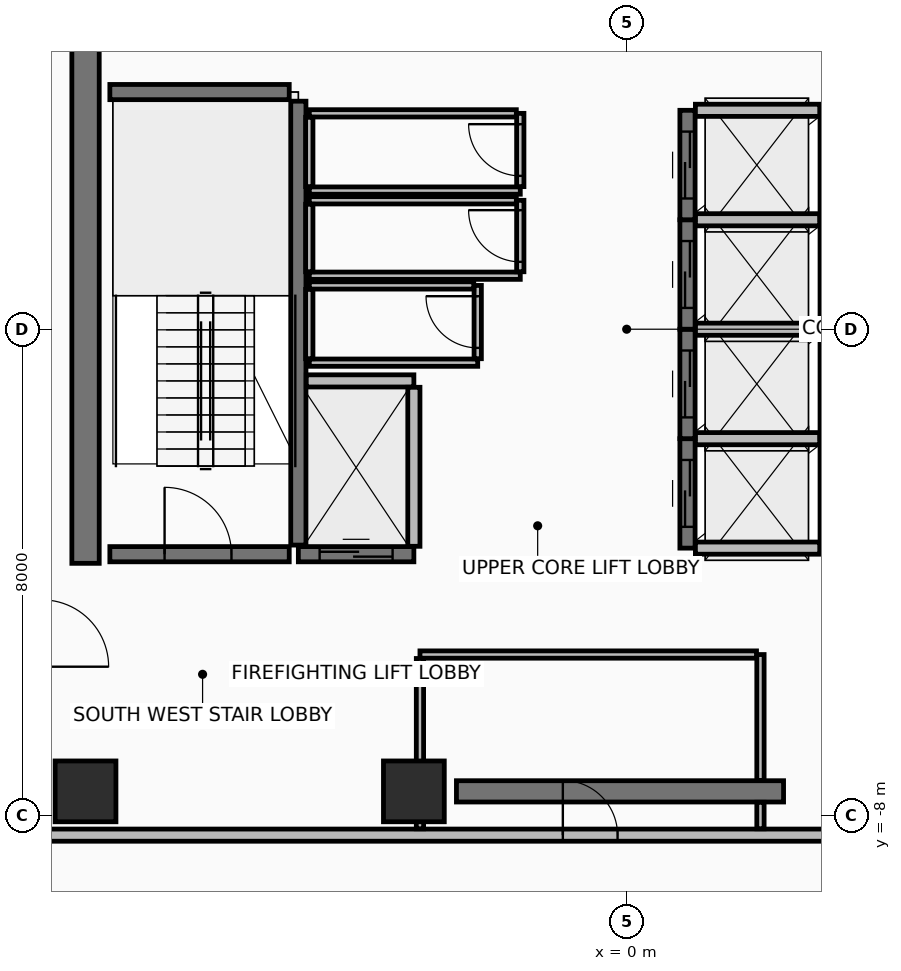
"""IFC4 building model, lengths in metres.
Left out: names, types, materials, properties, quantities, classifications, styles, units other than length and angle.
Written with IfcOpenShell. Run it as: python <this file> out.ifc"""

import sys

from ifc_helpers import new_model, si_unit, direction, frame, frame_2d, origin, origin_2d, place, context, subcontext, project, spatial, rectangle, extrude, element, fill, save


model = new_model("IFC4")
c1 = context("Model", 3, precision=1e-05, world=origin(), true_north=direction((0.0, 1.0)))
c2 = subcontext(c1, "Body", "Model", "MODEL_VIEW")
j1 = project(units=[si_unit("LENGTHUNIT", "METRE"), si_unit("PLANEANGLEUNIT", "RADIAN")], contexts=[c1])
p1 = place(None, origin())
s1 = spatial("IfcSite", under=j1, at=p1, CompositionType="ELEMENT")
p2 = place(p1, origin())
s2 = spatial("IfcBuilding", under=s1, at=p2, CompositionType="ELEMENT")
p3 = place(p2, frame((0.0, 0.0, 298.0)))
s3 = spatial("IfcBuildingStorey", under=s2, at=p3, CompositionType="ELEMENT", Elevation=298.0)
for number, where, z_axis, x_axis in (
    (1, (-8.9, -7.6, 0.0), (0.0, 0.0, 1.0), (1.0, 0.0, 0.0)),
    (2, (-3.5, -7.6, 0.0), (0.0, 0.0, 1.0), (1.0, 0.0, 0.0)),
):
    element("IfcColumn", number, at=place(p3, frame(where, z_axis=z_axis, x_axis=x_axis)), inside=s3, PredefinedType="COLUMN", context=c2, shape_type="SweptSolid", body=[
        extrude(rectangle(XDim=1.0, YDim=1.0, at=origin_2d()), origin(), (0.0, 0.0, 1.0), 4.15),
    ])
p4 = place(p3, frame((-2.8, -7.6, 0.0), z_axis=(0.0, 0.0, 1.0), x_axis=(1.0, 0.0, 0.0)))
e3 = element("IfcWall", 3, at=p4, inside=s3, PredefinedType="SHEAR", context=c2, shape_type="SweptSolid", body=[
    extrude(rectangle(XDim=5.38, YDim=0.35, at=frame_2d((2.69, 0.0))), origin(), (0.0, 0.0, 1.0), 3.95),
])
p5 = place(p3, frame((-8.9, -3.85, 0.0), z_axis=(0.0, 0.0, 1.0), x_axis=(0.0, 1.0, 0.0)))
e4 = element("IfcWall", 4, at=p5, inside=s3, PredefinedType="SHEAR", context=c2, shape_type="SweptSolid", body=[
    extrude(rectangle(XDim=10.7, YDim=0.45, at=frame_2d((5.35, 0.0))), origin(), (0.0, 0.0, 1.0), 3.95),
])
p6 = place(p3, frame((-9.62, -8.32, 0.0), z_axis=(0.0, 0.0, 1.0), x_axis=(1.0, 0.0, 0.0)))
e5 = element("IfcWall", 5, at=p6, inside=s3, PredefinedType="PARTITIONING", context=c2, shape_type="SweptSolid", body=[
    extrude(rectangle(XDim=19.24, YDim=0.2, at=frame_2d((9.62, 0.0))), origin(), (0.0, 0.0, 1.0), 3.445),
])
p7 = place(p6, frame((8.57, 0.0, 0.0)))
e6 = element("IfcOpeningElement", 6, at=p7, cuts=e5, PredefinedType="OPENING", context=c2, shape_type="SweptSolid", body=[
    extrude(rectangle(XDim=0.9, YDim=2.1, at=frame_2d((0.45, 1.05))), frame((0.0, 0.11, 0.0), z_axis=(0.0, -1.0, 0.0), x_axis=(1.0, 0.0, 0.0)), (0.0, 0.0, 1.0), 0.22),
])
p8 = place(p6, frame((14.045, 0.0, 0.0)))
e7 = element("IfcOpeningElement", 7, at=p8, cuts=e5, PredefinedType="OPENING", context=c2, shape_type="SweptSolid", body=[
    extrude(rectangle(XDim=0.9, YDim=2.1, at=frame_2d((0.45, 1.05))), frame((0.0, 0.11, 0.0), z_axis=(0.0, -1.0, 0.0), x_axis=(1.0, 0.0, 0.0)), (0.0, 0.0, 1.0), 0.22),
])
p9 = place(p6, frame((15.995, 0.0, 0.0)))
e8 = element("IfcOpeningElement", 8, at=p9, cuts=e5, PredefinedType="OPENING", context=c2, shape_type="SweptSolid", body=[
    extrude(rectangle(XDim=0.9, YDim=2.1, at=frame_2d((0.45, 1.05))), frame((0.0, 0.11, 0.0), z_axis=(0.0, -1.0, 0.0), x_axis=(1.0, 0.0, 0.0)), (0.0, 0.0, 1.0), 0.22),
])
p10 = place(p3, frame((-5.4, -3.55, 0.0), z_axis=(0.0, 0.0, 1.0), x_axis=(0.0, 1.0, 0.0)))
e9 = element("IfcWall", 9, at=p10, inside=s3, PredefinedType="SHEAR", context=c2, shape_type="SweptSolid", body=[
    extrude(rectangle(XDim=7.3, YDim=0.25, at=frame_2d((3.65, 0.0))), origin(), (0.0, 0.0, 1.0), 3.95),
])
p11 = place(p3, frame((-8.5, -3.7, 0.0), z_axis=(0.0, 0.0, 1.0), x_axis=(1.0, 0.0, 0.0)))
e10 = element("IfcWall", 10, at=p11, inside=s3, PredefinedType="SHEAR", context=c2, shape_type="SweptSolid", body=[
    extrude(rectangle(XDim=2.95, YDim=0.25, at=frame_2d((1.475, 0.0))), origin(), (0.0, 0.0, 1.0), 3.95),
])
p12 = place(p11, frame((0.9, 0.0, 0.0)))
e11 = element("IfcOpeningElement", 11, at=p12, cuts=e10, PredefinedType="OPENING", context=c2, shape_type="SweptSolid", body=[
    extrude(rectangle(XDim=1.1, YDim=2.15, at=frame_2d((0.55, 1.075))), frame((0.0, 0.135, 0.0), z_axis=(0.0, -1.0, 0.0), x_axis=(1.0, 0.0, 0.0)), (0.0, 0.0, 1.0), 0.27),
])
p13 = place(p3, frame((-8.5, 3.9, 0.0), z_axis=(0.0, 0.0, 1.0), x_axis=(1.0, 0.0, 0.0)))
e12 = element("IfcWall", 12, at=p13, inside=s3, PredefinedType="SHEAR", context=c2, shape_type="SweptSolid", body=[
    extrude(rectangle(XDim=2.95, YDim=0.25, at=frame_2d((1.475, 0.0))), origin(), (0.0, 0.0, 1.0), 3.95),
])
p14 = place(p3, frame((1.0, -3.6, 0.0), z_axis=(0.0, 0.0, 1.0), x_axis=(0.0, 1.0, 0.0)))
e13 = element("IfcWall", 13, at=p14, inside=s3, PredefinedType="SHEAR", context=c2, shape_type="SweptSolid", body=[
    extrude(rectangle(XDim=1.8, YDim=0.25, at=frame_2d((0.9, 0.0))), origin(), (0.0, 0.0, 1.0), 3.95),
])
p15 = place(p14, frame((0.35, 0.0, 0.0)))
e14 = element("IfcOpeningElement", 14, at=p15, cuts=e13, PredefinedType="OPENING", context=c2, shape_type="SweptSolid", body=[
    extrude(rectangle(XDim=1.1, YDim=2.2, at=frame_2d((0.55, 1.1))), frame((0.0, 0.135, 0.0), z_axis=(0.0, -1.0, 0.0), x_axis=(1.0, 0.0, 0.0)), (0.0, 0.0, 1.0), 0.27),
])
p16 = place(p3, frame((3.28, -3.6, 0.0), z_axis=(0.0, 0.0, 1.0), x_axis=(0.0, 1.0, 0.0)))
e15 = element("IfcWall", 15, at=p16, inside=s3, PredefinedType="PARTITIONING", context=c2, shape_type="SweptSolid", body=[
    extrude(rectangle(XDim=1.8, YDim=0.2, at=frame_2d((0.9, 0.0))), origin(), (0.0, 0.0, 1.0), 3.95),
])
for number, where, z_axis, x_axis in (
    (16, (1.13, -3.6, 0.0), (0.0, 0.0, 1.0), (1.0, 0.0, 0.0)),
    (17, (1.13, -1.8, 0.0), (0.0, 0.0, 1.0), (1.0, 0.0, 0.0)),
):
    element("IfcWall", number, at=place(p3, frame(where, z_axis=z_axis, x_axis=x_axis)), inside=s3, PredefinedType="PARTITIONING", context=c2, shape_type="SweptSolid", body=[
        extrude(rectangle(XDim=2.045, YDim=0.2, at=frame_2d((1.022, 0.0))), origin(), (0.0, 0.0, 1.0), 3.95),
    ])
p17 = place(p3, frame((1.0, -1.8, 0.0), z_axis=(0.0, 0.0, 1.0), x_axis=(0.0, 1.0, 0.0)))
e18 = element("IfcWall", 18, at=p17, inside=s3, PredefinedType="SHEAR", context=c2, shape_type="SweptSolid", body=[
    extrude(rectangle(XDim=1.8, YDim=0.25, at=frame_2d((0.9, 0.0))), origin(), (0.0, 0.0, 1.0), 3.95),
])
p18 = place(p17, frame((0.35, 0.0, 0.0)))
e19 = element("IfcOpeningElement", 19, at=p18, cuts=e18, PredefinedType="OPENING", context=c2, shape_type="SweptSolid", body=[
    extrude(rectangle(XDim=1.1, YDim=2.2, at=frame_2d((0.55, 1.1))), frame((0.0, 0.135, 0.0), z_axis=(0.0, -1.0, 0.0), x_axis=(1.0, 0.0, 0.0)), (0.0, 0.0, 1.0), 0.27),
])
p19 = place(p3, frame((3.28, -1.8, 0.0), z_axis=(0.0, 0.0, 1.0), x_axis=(0.0, 1.0, 0.0)))
e20 = element("IfcWall", 20, at=p19, inside=s3, PredefinedType="PARTITIONING", context=c2, shape_type="SweptSolid", body=[
    extrude(rectangle(XDim=1.8, YDim=0.2, at=frame_2d((0.9, 0.0))), origin(), (0.0, 0.0, 1.0), 3.95),
])
p20 = place(p3, frame((1.13, 0.0, 0.0), z_axis=(0.0, 0.0, 1.0), x_axis=(1.0, 0.0, 0.0)))
e21 = element("IfcWall", 21, at=p20, inside=s3, PredefinedType="PARTITIONING", context=c2, shape_type="SweptSolid", body=[
    extrude(rectangle(XDim=2.045, YDim=0.2, at=frame_2d((1.022, 0.0))), origin(), (0.0, 0.0, 1.0), 3.95),
])
p21 = place(p3, frame((1.0, 0.0, 0.0), z_axis=(0.0, 0.0, 1.0), x_axis=(0.0, 1.0, 0.0)))
e22 = element("IfcWall", 22, at=p21, inside=s3, PredefinedType="SHEAR", context=c2, shape_type="SweptSolid", body=[
    extrude(rectangle(XDim=1.8, YDim=0.25, at=frame_2d((0.9, 0.0))), origin(), (0.0, 0.0, 1.0), 3.95),
])
p22 = place(p21, frame((0.35, 0.0, 0.0)))
e23 = element("IfcOpeningElement", 23, at=p22, cuts=e22, PredefinedType="OPENING", context=c2, shape_type="SweptSolid", body=[
    extrude(rectangle(XDim=1.1, YDim=2.2, at=frame_2d((0.55, 1.1))), frame((0.0, 0.135, 0.0), z_axis=(0.0, -1.0, 0.0), x_axis=(1.0, 0.0, 0.0)), (0.0, 0.0, 1.0), 0.27),
])
p23 = place(p3, frame((3.28, 0.0, 0.0), z_axis=(0.0, 0.0, 1.0), x_axis=(0.0, 1.0, 0.0)))
e24 = element("IfcWall", 24, at=p23, inside=s3, PredefinedType="PARTITIONING", context=c2, shape_type="SweptSolid", body=[
    extrude(rectangle(XDim=1.8, YDim=0.2, at=frame_2d((0.9, 0.0))), origin(), (0.0, 0.0, 1.0), 3.95),
])
p24 = place(p3, frame((1.13, 1.8, 0.0), z_axis=(0.0, 0.0, 1.0), x_axis=(1.0, 0.0, 0.0)))
e25 = element("IfcWall", 25, at=p24, inside=s3, PredefinedType="PARTITIONING", context=c2, shape_type="SweptSolid", body=[
    extrude(rectangle(XDim=2.045, YDim=0.2, at=frame_2d((1.022, 0.0))), origin(), (0.0, 0.0, 1.0), 3.95),
])
p25 = place(p3, frame((1.0, 1.8, 0.0), z_axis=(0.0, 0.0, 1.0), x_axis=(0.0, 1.0, 0.0)))
e26 = element("IfcWall", 26, at=p25, inside=s3, PredefinedType="SHEAR", context=c2, shape_type="SweptSolid", body=[
    extrude(rectangle(XDim=1.8, YDim=0.25, at=frame_2d((0.9, 0.0))), origin(), (0.0, 0.0, 1.0), 3.95),
])
p26 = place(p25, frame((0.35, 0.0, 0.0)))
e27 = element("IfcOpeningElement", 27, at=p26, cuts=e26, PredefinedType="OPENING", context=c2, shape_type="SweptSolid", body=[
    extrude(rectangle(XDim=1.1, YDim=2.2, at=frame_2d((0.55, 1.1))), frame((0.0, 0.135, 0.0), z_axis=(0.0, -1.0, 0.0), x_axis=(1.0, 0.0, 0.0)), (0.0, 0.0, 1.0), 0.27),
])
p27 = place(p3, frame((3.28, 1.8, 0.0), z_axis=(0.0, 0.0, 1.0), x_axis=(0.0, 1.0, 0.0)))
e28 = element("IfcWall", 28, at=p27, inside=s3, PredefinedType="PARTITIONING", context=c2, shape_type="SweptSolid", body=[
    extrude(rectangle(XDim=1.8, YDim=0.2, at=frame_2d((0.9, 0.0))), origin(), (0.0, 0.0, 1.0), 3.95),
])
p28 = place(p3, frame((1.13, 3.6, 0.0), z_axis=(0.0, 0.0, 1.0), x_axis=(1.0, 0.0, 0.0)))
e29 = element("IfcWall", 29, at=p28, inside=s3, PredefinedType="PARTITIONING", context=c2, shape_type="SweptSolid", body=[
    extrude(rectangle(XDim=2.045, YDim=0.2, at=frame_2d((1.022, 0.0))), origin(), (0.0, 0.0, 1.0), 3.245),
])
p29 = place(p3, frame((-5.4, -3.7, 0.0), z_axis=(0.0, 0.0, 1.0), x_axis=(1.0, 0.0, 0.0)))
e30 = element("IfcWall", 30, at=p29, inside=s3, PredefinedType="SHEAR", context=c2, shape_type="SweptSolid", body=[
    extrude(rectangle(XDim=1.9, YDim=0.25, at=frame_2d((0.95, 0.0))), origin(), (0.0, 0.0, 1.0), 3.95),
])
p30 = place(p29, frame((0.35, 0.0, 0.0)))
e31 = element("IfcOpeningElement", 31, at=p30, cuts=e30, PredefinedType="OPENING", context=c2, shape_type="SweptSolid", body=[
    extrude(rectangle(XDim=1.2, YDim=2.2, at=frame_2d((0.6, 1.1))), frame((0.0, 0.135, 0.0), z_axis=(0.0, -1.0, 0.0), x_axis=(1.0, 0.0, 0.0)), (0.0, 0.0, 1.0), 0.27),
])
p31 = place(p3, frame((-5.27, -0.85, 0.0), z_axis=(0.0, 0.0, 1.0), x_axis=(1.0, 0.0, 0.0)))
e32 = element("IfcWall", 32, at=p31, inside=s3, PredefinedType="PARTITIONING", context=c2, shape_type="SweptSolid", body=[
    extrude(rectangle(XDim=1.77, YDim=0.2, at=frame_2d((0.885, 0.0))), origin(), (0.0, 0.0, 1.0), 3.95),
])
p32 = place(p3, frame((-3.5, -3.57, 0.0), z_axis=(0.0, 0.0, 1.0), x_axis=(0.0, 1.0, 0.0)))
e33 = element("IfcWall", 33, at=p32, inside=s3, PredefinedType="PARTITIONING", context=c2, shape_type="SweptSolid", body=[
    extrude(rectangle(XDim=2.615, YDim=0.2, at=frame_2d((1.308, 0.0))), origin(), (0.0, 0.0, 1.0), 3.95),
])
p33 = place(p3, frame((-5.22, 2.28, 0.0), z_axis=(0.0, 0.0, 1.0), x_axis=(1.0, 0.0, 0.0)))
e34 = element("IfcWall", 34, at=p33, inside=s3, PredefinedType="PARTITIONING", context=c2, shape_type="SweptSolid", body=[
    extrude(rectangle(XDim=3.47, YDim=0.12, at=frame_2d((1.735, 0.0))), origin(), (0.0, 0.0, 1.0), 3.95),
])
p34 = place(p3, frame((-1.75, 2.345, 0.0), z_axis=(0.0, 0.0, 1.0), x_axis=(0.0, 1.0, 0.0)))
e35 = element("IfcWall", 35, at=p34, inside=s3, PredefinedType="PARTITIONING", context=c2, shape_type="SweptSolid", body=[
    extrude(rectangle(XDim=1.205, YDim=0.12, at=frame_2d((0.603, 0.0))), origin(), (0.0, 0.0, 1.0), 3.95),
])
p35 = place(p34, frame((0.177, 0.0, 0.0)))
e36 = element("IfcOpeningElement", 36, at=p35, cuts=e35, PredefinedType="OPENING", context=c2, shape_type="SweptSolid", body=[
    extrude(rectangle(XDim=0.85, YDim=2.1, at=frame_2d((0.425, 1.05))), frame((0.0, 0.07, 0.0), z_axis=(0.0, -1.0, 0.0), x_axis=(1.0, 0.0, 0.0)), (0.0, 0.0, 1.0), 0.14),
])
p36 = place(p3, frame((-1.815, 3.55, 0.0), z_axis=(0.0, 0.0, 1.0), x_axis=(-1.0, 0.0, 0.0)))
e37 = element("IfcWall", 37, at=p36, inside=s3, PredefinedType="PARTITIONING", context=c2, shape_type="SweptSolid", body=[
    extrude(rectangle(XDim=3.405, YDim=0.12, at=frame_2d((1.703, 0.0))), origin(), (0.0, 0.0, 1.0), 3.95),
])
p37 = place(p3, frame((-5.22, 3.485, 0.0), z_axis=(0.0, 0.0, 1.0), x_axis=(0.0, -1.0, 0.0)))
e38 = element("IfcWall", 38, at=p37, inside=s3, PredefinedType="PARTITIONING", context=c2, shape_type="SweptSolid", body=[
    extrude(rectangle(XDim=1.14, YDim=0.12, at=frame_2d((0.57, 0.0))), origin(), (0.0, 0.0, 1.0), 3.95),
])
p38 = place(p3, frame((-5.22, 0.88, 0.0), z_axis=(0.0, 0.0, 1.0), x_axis=(1.0, 0.0, 0.0)))
e39 = element("IfcWall", 39, at=p38, inside=s3, PredefinedType="PARTITIONING", context=c2, shape_type="SweptSolid", body=[
    extrude(rectangle(XDim=3.47, YDim=0.12, at=frame_2d((1.735, 0.0))), origin(), (0.0, 0.0, 1.0), 3.95),
])
p39 = place(p3, frame((-1.75, 0.945, 0.0), z_axis=(0.0, 0.0, 1.0), x_axis=(0.0, 1.0, 0.0)))
e40 = element("IfcWall", 40, at=p39, inside=s3, PredefinedType="PARTITIONING", context=c2, shape_type="SweptSolid", body=[
    extrude(rectangle(XDim=1.175, YDim=0.12, at=frame_2d((0.587, 0.0))), origin(), (0.0, 0.0, 1.0), 3.95),
])
p40 = place(p39, frame((0.163, 0.0, 0.0)))
e41 = element("IfcOpeningElement", 41, at=p40, cuts=e40, PredefinedType="OPENING", context=c2, shape_type="SweptSolid", body=[
    extrude(rectangle(XDim=0.85, YDim=2.1, at=frame_2d((0.425, 1.05))), frame((0.0, 0.07, 0.0), z_axis=(0.0, -1.0, 0.0), x_axis=(1.0, 0.0, 0.0)), (0.0, 0.0, 1.0), 0.14),
])
p41 = place(p3, frame((-1.815, 2.12, 0.0), z_axis=(0.0, 0.0, 1.0), x_axis=(-1.0, 0.0, 0.0)))
e42 = element("IfcWall", 42, at=p41, inside=s3, PredefinedType="PARTITIONING", context=c2, shape_type="SweptSolid", body=[
    extrude(rectangle(XDim=3.405, YDim=0.12, at=frame_2d((1.703, 0.0))), origin(), (0.0, 0.0, 1.0), 3.95),
])
p42 = place(p3, frame((-5.22, 2.055, 0.0), z_axis=(0.0, 0.0, 1.0), x_axis=(0.0, -1.0, 0.0)))
e43 = element("IfcWall", 43, at=p42, inside=s3, PredefinedType="PARTITIONING", context=c2, shape_type="SweptSolid", body=[
    extrude(rectangle(XDim=1.11, YDim=0.12, at=frame_2d((0.555, 0.0))), origin(), (0.0, 0.0, 1.0), 3.95),
])
p43 = place(p3, frame((-5.22, -0.55, 0.0), z_axis=(0.0, 0.0, 1.0), x_axis=(1.0, 0.0, 0.0)))
e44 = element("IfcWall", 44, at=p43, inside=s3, PredefinedType="PARTITIONING", context=c2, shape_type="SweptSolid", body=[
    extrude(rectangle(XDim=2.77, YDim=0.12, at=frame_2d((1.385, 0.0))), origin(), (0.0, 0.0, 1.0), 3.95),
])
p44 = place(p3, frame((-2.45, -0.485, 0.0), z_axis=(0.0, 0.0, 1.0), x_axis=(0.0, 1.0, 0.0)))
e45 = element("IfcWall", 45, at=p44, inside=s3, PredefinedType="PARTITIONING", context=c2, shape_type="SweptSolid", body=[
    extrude(rectangle(XDim=1.205, YDim=0.12, at=frame_2d((0.603, 0.0))), origin(), (0.0, 0.0, 1.0), 3.95),
])
p45 = place(p44, frame((0.178, 0.0, 0.0)))
e46 = element("IfcOpeningElement", 46, at=p45, cuts=e45, PredefinedType="OPENING", context=c2, shape_type="SweptSolid", body=[
    extrude(rectangle(XDim=0.85, YDim=2.1, at=frame_2d((0.425, 1.05))), frame((0.0, 0.07, 0.0), z_axis=(0.0, -1.0, 0.0), x_axis=(1.0, 0.0, 0.0)), (0.0, 0.0, 1.0), 0.14),
])
p46 = place(p3, frame((-2.515, 0.72, 0.0), z_axis=(0.0, 0.0, 1.0), x_axis=(-1.0, 0.0, 0.0)))
e47 = element("IfcWall", 47, at=p46, inside=s3, PredefinedType="PARTITIONING", context=c2, shape_type="SweptSolid", body=[
    extrude(rectangle(XDim=2.705, YDim=0.12, at=frame_2d((1.353, 0.0))), origin(), (0.0, 0.0, 1.0), 3.95),
])
p47 = place(p3, frame((-5.22, 0.655, 0.0), z_axis=(0.0, 0.0, 1.0), x_axis=(0.0, -1.0, 0.0)))
e48 = element("IfcWall", 48, at=p47, inside=s3, PredefinedType="PARTITIONING", context=c2, shape_type="SweptSolid", body=[
    extrude(rectangle(XDim=1.14, YDim=0.12, at=frame_2d((0.57, 0.0))), origin(), (0.0, 0.0, 1.0), 3.95),
])
p48 = place(p3, frame((2.2, -8.215, 0.0), z_axis=(0.0, 0.0, 1.0), x_axis=(0.0, 1.0, 0.0)))
e49 = element("IfcWall", 49, at=p48, inside=s3, PredefinedType="PARTITIONING", context=c2, shape_type="SweptSolid", body=[
    extrude(rectangle(XDim=0.435, YDim=0.12, at=frame_2d((0.218, 0.0))), origin(), (0.0, 0.0, 1.0), 3.245),
])
p49 = place(p3, frame((2.2, -7.42, 0.0), z_axis=(0.0, 0.0, 1.0), x_axis=(0.0, 1.0, 0.0)))
e50 = element("IfcWall", 50, at=p49, inside=s3, PredefinedType="PARTITIONING", context=c2, shape_type="SweptSolid", body=[
    extrude(rectangle(XDim=2.07, YDim=0.12, at=frame_2d((1.035, 0.0))), origin(), (0.0, 0.0, 1.0), 3.245),
])
p50 = place(p3, frame((2.135, -5.35, 0.0), z_axis=(0.0, 0.0, 1.0), x_axis=(-1.0, 0.0, 0.0)))
e51 = element("IfcWall", 51, at=p50, inside=s3, PredefinedType="PARTITIONING", context=c2, shape_type="SweptSolid", body=[
    extrude(rectangle(XDim=5.535, YDim=0.12, at=frame_2d((2.768, 0.0))), origin(), (0.0, 0.0, 1.0), 3.245),
])
p51 = place(p3, frame((-3.4, -5.415, 0.0), z_axis=(0.0, 0.0, 1.0), x_axis=(0.0, -1.0, 0.0)))
e52 = element("IfcWall", 52, at=p51, inside=s3, PredefinedType="PARTITIONING", context=c2, shape_type="SweptSolid", body=[
    extrude(rectangle(XDim=2.8, YDim=0.12, at=frame_2d((1.4, 0.0))), origin(), (0.0, 0.0, 1.0), 3.245),
])
p52 = place(p12, origin())
e53 = element("IfcDoor", 53, at=p52, inside=s3, OperationType="SINGLE_SWING_LEFT", PredefinedType="DOOR", context=c2, shape_type="SweptSolid", body=[
    extrude(rectangle(XDim=1.1, YDim=2.15, at=frame_2d((0.55, 1.075))), frame((0.0, 0.025, 0.0), z_axis=(0.0, -1.0, 0.0), x_axis=(1.0, 0.0, 0.0)), (0.0, 0.0, 1.0), 0.05),
])
fill(e11, e53)
p53 = place(p15, origin())
e54 = element("IfcDoor", 54, at=p53, inside=s3, OperationType="SLIDING_TO_LEFT", PredefinedType="DOOR", context=c2, shape_type="SweptSolid", body=[
    extrude(rectangle(XDim=1.1, YDim=2.2, at=frame_2d((0.55, 1.1))), frame((0.0, 0.025, 0.0), z_axis=(0.0, -1.0, 0.0), x_axis=(1.0, 0.0, 0.0)), (0.0, 0.0, 1.0), 0.05),
])
fill(e14, e54)
p54 = place(p18, origin())
e55 = element("IfcDoor", 55, at=p54, inside=s3, OperationType="SLIDING_TO_LEFT", PredefinedType="DOOR", context=c2, shape_type="SweptSolid", body=[
    extrude(rectangle(XDim=1.1, YDim=2.2, at=frame_2d((0.55, 1.1))), frame((0.0, 0.025, 0.0), z_axis=(0.0, -1.0, 0.0), x_axis=(1.0, 0.0, 0.0)), (0.0, 0.0, 1.0), 0.05),
])
fill(e19, e55)
p55 = place(p22, origin())
e56 = element("IfcDoor", 56, at=p55, inside=s3, OperationType="SLIDING_TO_LEFT", PredefinedType="DOOR", context=c2, shape_type="SweptSolid", body=[
    extrude(rectangle(XDim=1.1, YDim=2.2, at=frame_2d((0.55, 1.1))), frame((0.0, 0.025, 0.0), z_axis=(0.0, -1.0, 0.0), x_axis=(1.0, 0.0, 0.0)), (0.0, 0.0, 1.0), 0.05),
])
fill(e23, e56)
p56 = place(p26, origin())
e57 = element("IfcDoor", 57, at=p56, inside=s3, OperationType="SLIDING_TO_LEFT", PredefinedType="DOOR", context=c2, shape_type="SweptSolid", body=[
    extrude(rectangle(XDim=1.1, YDim=2.2, at=frame_2d((0.55, 1.1))), frame((0.0, 0.025, 0.0), z_axis=(0.0, -1.0, 0.0), x_axis=(1.0, 0.0, 0.0)), (0.0, 0.0, 1.0), 0.05),
])
fill(e27, e57)
p57 = place(p30, origin())
e58 = element("IfcDoor", 58, at=p57, inside=s3, OperationType="SLIDING_TO_RIGHT", PredefinedType="DOOR", context=c2, shape_type="SweptSolid", body=[
    extrude(rectangle(XDim=1.2, YDim=2.2, at=frame_2d((0.6, 1.1))), frame((0.0, 0.025, 0.0), z_axis=(0.0, -1.0, 0.0), x_axis=(1.0, 0.0, 0.0)), (0.0, 0.0, 1.0), 0.05),
])
fill(e31, e58)
p58 = place(p35, frame((0.85, 0.0, 0.0), z_axis=(0.0, 0.0, 1.0), x_axis=(-1.0, 0.0, 0.0)))
e59 = element("IfcDoor", 59, at=p58, inside=s3, OperationType="SINGLE_SWING_RIGHT", PredefinedType="DOOR", context=c2, shape_type="SweptSolid", body=[
    extrude(rectangle(XDim=0.85, YDim=2.1, at=frame_2d((0.425, 1.05))), frame((0.0, 0.025, 0.0), z_axis=(0.0, -1.0, 0.0), x_axis=(1.0, 0.0, 0.0)), (0.0, 0.0, 1.0), 0.05),
])
fill(e36, e59)
p59 = place(p40, frame((0.85, 0.0, 0.0), z_axis=(0.0, 0.0, 1.0), x_axis=(-1.0, 0.0, 0.0)))
e60 = element("IfcDoor", 60, at=p59, inside=s3, OperationType="SINGLE_SWING_RIGHT", PredefinedType="DOOR", context=c2, shape_type="SweptSolid", body=[
    extrude(rectangle(XDim=0.85, YDim=2.1, at=frame_2d((0.425, 1.05))), frame((0.0, 0.025, 0.0), z_axis=(0.0, -1.0, 0.0), x_axis=(1.0, 0.0, 0.0)), (0.0, 0.0, 1.0), 0.05),
])
fill(e41, e60)
p60 = place(p45, frame((0.85, 0.0, 0.0), z_axis=(0.0, 0.0, 1.0), x_axis=(-1.0, 0.0, 0.0)))
e61 = element("IfcDoor", 61, at=p60, inside=s3, OperationType="SINGLE_SWING_RIGHT", PredefinedType="DOOR", context=c2, shape_type="SweptSolid", body=[
    extrude(rectangle(XDim=0.85, YDim=2.1, at=frame_2d((0.425, 1.05))), frame((0.0, 0.025, 0.0), z_axis=(0.0, -1.0, 0.0), x_axis=(1.0, 0.0, 0.0)), (0.0, 0.0, 1.0), 0.05),
])
fill(e46, e61)
p61 = place(p7, origin())
e62 = element("IfcDoor", 62, at=p61, inside=s3, OperationType="SINGLE_SWING_LEFT", PredefinedType="DOOR", context=c2, shape_type="SweptSolid", body=[
    extrude(rectangle(XDim=0.9, YDim=2.1, at=frame_2d((0.45, 1.05))), frame((0.0, 0.025, 0.0), z_axis=(0.0, -1.0, 0.0), x_axis=(1.0, 0.0, 0.0)), (0.0, 0.0, 1.0), 0.05),
])
fill(e6, e62)
save(model, sys.argv[1])
